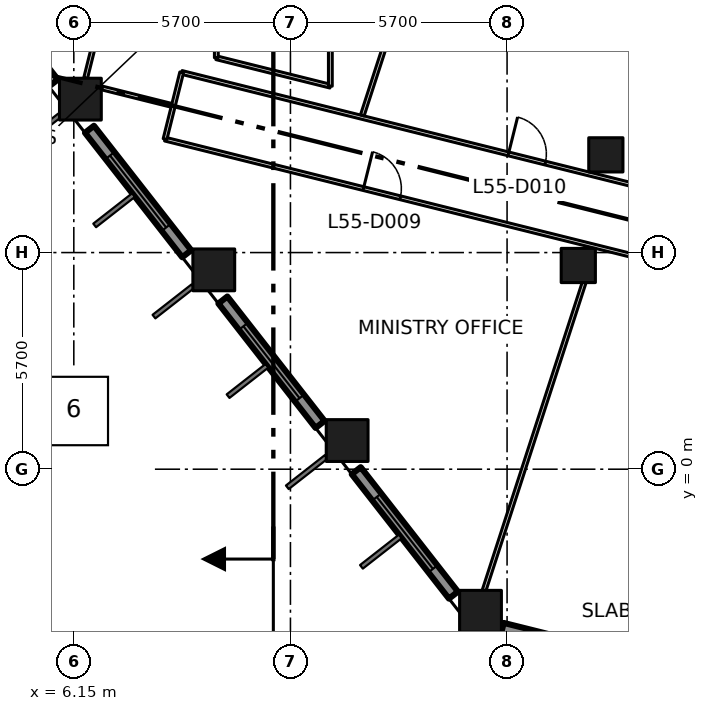
"""IFC4 building model, lengths in metres.
Left out: names, types, materials, properties, quantities, classifications, styles, units other than length and angle.
Written with IfcOpenShell. Run it as: python <this file> out.ifc"""

import sys

from ifc_helpers import new_model, si_unit, direction, frame, frame_2d, origin, origin_2d, place, context, subcontext, project, spatial, rectangle, extrude, element, fill, save


model = new_model("IFC4")
c1 = context("Model", 3, precision=1e-05, world=origin(), true_north=direction((0.0, 1.0)))
c2 = subcontext(c1, "Body", "Model", "MODEL_VIEW")
j1 = project(units=[si_unit("LENGTHUNIT", "METRE"), si_unit("PLANEANGLEUNIT", "RADIAN")], contexts=[c1])
p1 = place(None, origin())
s1 = spatial("IfcSite", under=j1, at=p1, CompositionType="ELEMENT")
p2 = place(p1, origin())
s2 = spatial("IfcBuilding", under=s1, at=p2, CompositionType="ELEMENT")
p3 = place(p2, frame((0.0, 0.0, 242.4)))
s3 = spatial("IfcBuildingStorey", under=s2, at=p3, CompositionType="ELEMENT", Elevation=242.4)
for number, where, z_axis, x_axis in (
    (1, (16.851, -3.738, 0.0), (0.0, 0.0, 1.0), (1.0, 0.0, 0.0)),
    (2, (13.342, 0.754, 0.0), (0.0, 0.0, 1.0), (1.0, 0.0, 0.0)),
    (3, (9.833, 5.245, 0.0), (0.0, 0.0, 1.0), (1.0, 0.0, 0.0)),
    (4, (6.323, 9.737, 0.0), (0.0, 0.0, 1.0), (1.0, 0.0, 0.0)),
):
    element("IfcColumn", number, at=place(p3, frame(where, z_axis=z_axis, x_axis=x_axis)), inside=s3, PredefinedType="COLUMN", context=c2, shape_type="SweptSolid", body=[
        extrude(rectangle(XDim=1.1, YDim=1.1, at=origin_2d()), origin(), (0.0, 0.0, 1.0), 4.2),
    ])
for number, where, z_axis, x_axis in (
    (5, (19.424, 5.36, 0.0), (0.0, 0.0, 1.0), (1.0, 0.0, 0.0)),
    (6, (20.149, 8.271, 0.0), (0.0, 0.0, 1.0), (1.0, 0.0, 0.0)),
):
    element("IfcColumn", number, at=place(p3, frame(where, z_axis=z_axis, x_axis=x_axis)), inside=s3, PredefinedType="COLUMN", context=c2, shape_type="SweptSolid", body=[
        extrude(rectangle(XDim=0.9, YDim=0.9, at=origin_2d()), origin(), (0.0, 0.0, 1.0), 4.2),
    ])
p4 = place(p3, frame((3.053, 13.436, 0.0), z_axis=(0.0, 0.0, 1.0), x_axis=(0.615699893917, -0.787980736205, 0.0)))
e7 = element("IfcWall", 7, at=p4, inside=s3, PredefinedType="SOLIDWALL", context=c2, shape_type="SweptSolid", body=[
    extrude(rectangle(XDim=4.156, YDim=0.3, at=frame_2d((2.078, 0.0))), origin(), (0.0, 0.0, 1.0), 3.15),
])
p5 = place(p4, frame((0.878, 0.0, 0.8)))
e8 = element("IfcOpeningElement", 8, at=p5, cuts=e7, PredefinedType="OPENING", context=c2, shape_type="SweptSolid", body=[
    extrude(rectangle(XDim=2.4, YDim=2.1, at=frame_2d((1.2, 1.05))), frame((0.0, 0.16, 0.0), z_axis=(0.0, -1.0, 0.0), x_axis=(1.0, 0.0, 0.0)), (0.0, 0.0, 1.0), 0.32),
])
p6 = place(p3, frame((6.562, 8.944, 0.0), z_axis=(0.0, 0.0, 1.0), x_axis=(0.615699893917, -0.787980736205, 0.0)))
e9 = element("IfcWall", 9, at=p6, inside=s3, PredefinedType="SOLIDWALL", context=c2, shape_type="SweptSolid", body=[
    extrude(rectangle(XDim=4.156, YDim=0.3, at=frame_2d((2.078, 0.0))), origin(), (0.0, 0.0, 1.0), 3.15),
])
p7 = place(p6, frame((0.878, 0.0, 0.8)))
e10 = element("IfcOpeningElement", 10, at=p7, cuts=e9, PredefinedType="OPENING", context=c2, shape_type="SweptSolid", body=[
    extrude(rectangle(XDim=2.4, YDim=2.1, at=frame_2d((1.2, 1.05))), frame((0.0, 0.16, 0.0), z_axis=(0.0, -1.0, 0.0), x_axis=(1.0, 0.0, 0.0)), (0.0, 0.0, 1.0), 0.32),
])
p8 = place(p3, frame((10.072, 4.452, 0.0), z_axis=(0.0, 0.0, 1.0), x_axis=(0.615660006568, -0.788011901124, 0.0)))
e11 = element("IfcWall", 11, at=p8, inside=s3, PredefinedType="SOLIDWALL", context=c2, shape_type="SweptSolid", body=[
    extrude(rectangle(XDim=4.155, YDim=0.3, at=frame_2d((2.077, 0.0))), origin(), (0.0, 0.0, 1.0), 3.15),
])
p9 = place(p8, frame((0.878, 0.0, 0.8)))
e12 = element("IfcOpeningElement", 12, at=p9, cuts=e11, PredefinedType="OPENING", context=c2, shape_type="SweptSolid", body=[
    extrude(rectangle(XDim=2.4, YDim=2.1, at=frame_2d((1.2, 1.05))), frame((0.0, 0.16, 0.0), z_axis=(0.0, -1.0, 0.0), x_axis=(1.0, 0.0, 0.0)), (0.0, 0.0, 1.0), 0.32),
])
p10 = place(p3, frame((13.581, -0.039, 0.0), z_axis=(0.0, 0.0, 1.0), x_axis=(0.615545986363, -0.788100969846, 0.0)))
e13 = element("IfcWall", 13, at=p10, inside=s3, PredefinedType="SOLIDWALL", context=c2, shape_type="SweptSolid", body=[
    extrude(rectangle(XDim=4.156, YDim=0.3, at=frame_2d((2.078, 0.0))), origin(), (0.0, 0.0, 1.0), 3.15),
])
p11 = place(p10, frame((0.878, 0.0, 0.8)))
e14 = element("IfcOpeningElement", 14, at=p11, cuts=e13, PredefinedType="OPENING", context=c2, shape_type="SweptSolid", body=[
    extrude(rectangle(XDim=2.4, YDim=2.1, at=frame_2d((1.2, 1.05))), frame((0.0, 0.16, 0.0), z_axis=(0.0, -1.0, 0.0), x_axis=(1.0, 0.0, 0.0)), (0.0, 0.0, 1.0), 0.32),
])
p12 = place(p3, frame((17.425, -4.19, 0.0), z_axis=(0.0, 0.0, 1.0), x_axis=(0.970270592847, -0.242022677978, 0.0)))
e15 = element("IfcWall", 15, at=p12, inside=s3, PredefinedType="SOLIDWALL", context=c2, shape_type="SweptSolid", body=[
    extrude(rectangle(XDim=4.368, YDim=0.3, at=frame_2d((2.184, 0.0))), origin(), (0.0, 0.0, 1.0), 3.15),
])
p13 = place(p12, frame((0.983, 0.0, 0.8)))
e16 = element("IfcOpeningElement", 16, at=p13, cuts=e15, PredefinedType="OPENING", context=c2, shape_type="SweptSolid", body=[
    extrude(rectangle(XDim=2.4, YDim=2.1, at=frame_2d((1.2, 1.05))), frame((0.0, 0.16, 0.0), z_axis=(0.0, -1.0, 0.0), x_axis=(1.0, 0.0, 0.0)), (0.0, 0.0, 1.0), 0.32),
])
p14 = place(p3, frame((8.55, 8.685, 0.0), z_axis=(0.0, 0.0, 1.0), x_axis=(0.970297603286, -0.241914367199, 0.0)))
e17 = element("IfcWall", 17, at=p14, inside=s3, PredefinedType="PARTITIONING", context=c2, shape_type="SweptSolid", body=[
    extrude(rectangle(XDim=50.675, YDim=0.1, at=frame_2d((25.337, 0.0))), origin(), (0.0, 0.0, 1.0), 3.9),
])
p15 = place(p14, frame((35.657, 0.0, 0.0)))
e18 = element("IfcOpeningElement", 18, at=p15, cuts=e17, PredefinedType="OPENING", context=c2, shape_type="SweptSolid", body=[
    extrude(rectangle(XDim=1.8, YDim=2.1, at=frame_2d((0.9, 1.05))), frame((0.0, 0.06, 0.0), z_axis=(0.0, -1.0, 0.0), x_axis=(1.0, 0.0, 0.0)), (0.0, 0.0, 1.0), 0.12),
])
p16 = place(p14, frame((14.657, 0.0, 0.0)))
e19 = element("IfcOpeningElement", 19, at=p16, cuts=e17, PredefinedType="OPENING", context=c2, shape_type="SweptSolid", body=[
    extrude(rectangle(XDim=1.0, YDim=2.1, at=frame_2d((0.5, 1.05))), frame((0.0, 0.06, 0.0), z_axis=(0.0, -1.0, 0.0), x_axis=(1.0, 0.0, 0.0)), (0.0, 0.0, 1.0), 0.12),
])
p17 = place(p14, frame((19.357, 0.0, 0.0)))
e20 = element("IfcOpeningElement", 20, at=p17, cuts=e17, PredefinedType="OPENING", context=c2, shape_type="SweptSolid", body=[
    extrude(rectangle(XDim=1.8, YDim=2.1, at=frame_2d((0.9, 1.05))), frame((0.0, 0.06, 0.0), z_axis=(0.0, -1.0, 0.0), x_axis=(1.0, 0.0, 0.0)), (0.0, 0.0, 1.0), 0.12),
])
p18 = place(p14, frame((5.38, 0.0, 0.0)))
e21 = element("IfcOpeningElement", 21, at=p18, cuts=e17, PredefinedType="OPENING", context=c2, shape_type="SweptSolid", body=[
    extrude(rectangle(XDim=1.0, YDim=2.1, at=frame_2d((0.5, 1.05))), frame((0.0, 0.06, 0.0), z_axis=(0.0, -1.0, 0.0), x_axis=(1.0, 0.0, 0.0)), (0.0, 0.0, 1.0), 0.12),
])
p19 = place(p3, frame((8.988, 10.44, 0.0), z_axis=(0.0, 0.0, 1.0), x_axis=(0.970301223092, -0.241899848006, 0.0)))
e22 = element("IfcWall", 22, at=p19, inside=s3, PredefinedType="PARTITIONING", context=c2, shape_type="SweptSolid", body=[
    extrude(rectangle(XDim=19.879, YDim=0.1, at=frame_2d((9.94, 0.0))), origin(), (0.0, 0.0, 1.0), 3.9),
])
p20 = place(p19, frame((8.861, 0.0, 0.0)))
e23 = element("IfcOpeningElement", 23, at=p20, cuts=e22, PredefinedType="OPENING", context=c2, shape_type="SweptSolid", body=[
    extrude(rectangle(XDim=1.0, YDim=2.1, at=frame_2d((0.5, 1.05))), frame((0.0, 0.06, 0.0), z_axis=(0.0, -1.0, 0.0), x_axis=(1.0, 0.0, 0.0)), (0.0, 0.0, 1.0), 0.12),
])
p21 = place(p3, frame((8.988, 10.44, 0.0), z_axis=(0.0, 0.0, 1.0), x_axis=(-0.242154485745, -0.970237705428, 0.0)))
e24 = element("IfcWall", 24, at=p21, inside=s3, PredefinedType="PARTITIONING", context=c2, shape_type="SweptSolid", body=[
    extrude(rectangle(XDim=1.809, YDim=0.1, at=frame_2d((0.904, 0.0))), origin(), (0.0, 0.0, 1.0), 3.9),
])
p22 = place(p3, frame((9.9, 10.826, 0.0), z_axis=(0.0, 0.0, 1.0), x_axis=(0.970290953223, -0.241941038466, 0.0)))
e25 = element("IfcWall", 25, at=p22, inside=s3, PredefinedType="PARTITIONING", context=c2, shape_type="SweptSolid", body=[
    extrude(rectangle(XDim=3.092, YDim=0.1, at=frame_2d((1.546, 0.0))), origin(), (0.0, 0.0, 1.0), 3.9),
])
p23 = place(p3, frame((9.9, 12.2, 0.0), z_axis=(0.0, 0.0, 1.0), x_axis=(0.0, -1.0, 0.0)))
e26 = element("IfcWall", 26, at=p23, inside=s3, PredefinedType="PARTITIONING", context=c2, shape_type="SweptSolid", body=[
    extrude(rectangle(XDim=1.374, YDim=0.1, at=frame_2d((0.687, 0.0))), origin(), (0.0, 0.0, 1.0), 3.9),
])
p24 = place(p3, frame((12.9, 10.078, 0.0), z_axis=(0.0, 0.0, 1.0), x_axis=(0.0, 1.0, 0.0)))
e27 = element("IfcWall", 27, at=p24, inside=s3, PredefinedType="PARTITIONING", context=c2, shape_type="SweptSolid", body=[
    extrude(rectangle(XDim=4.022, YDim=0.1, at=frame_2d((2.011, 0.0))), origin(), (0.0, 0.0, 1.0), 3.9),
])
p25 = place(p3, frame((6.922, 12.138, 0.0), z_axis=(0.0, 0.0, 1.0), x_axis=(-0.242264600824, -0.970210215978, 0.0)))
e28 = element("IfcWall", 28, at=p25, inside=s3, PredefinedType="PARTITIONING", context=c2, shape_type="SweptSolid", body=[
    extrude(rectangle(XDim=1.908, YDim=0.1, at=frame_2d((0.954, 0.0))), origin(), (0.0, 0.0, 1.0), 3.9),
])
p26 = place(p3, frame((8.72, 9.574, 0.0), z_axis=(0.0, 0.0, 1.0), x_axis=(-0.970240497311, 0.242143299263, 0.0)))
e29 = element("IfcWall", 29, at=p26, inside=s3, PredefinedType="PARTITIONING", context=c2, shape_type="SweptSolid", body=[
    extrude(rectangle(XDim=1.904, YDim=0.1, at=frame_2d((0.952, 0.0))), origin(), (0.0, 0.0, 1.0), 3.9),
])
p27 = place(p3, frame((13.741, 9.31, 0.0), z_axis=(0.0, 0.0, 1.0), x_axis=(0.308976461467, 0.95106968528, 0.0)))
e30 = element("IfcWall", 30, at=p27, inside=s3, PredefinedType="PARTITIONING", context=c2, shape_type="SweptSolid", body=[
    extrude(rectangle(XDim=5.036, YDim=0.1, at=frame_2d((2.518, 0.0))), origin(), (0.0, 0.0, 1.0), 3.9),
])
p28 = place(p3, frame((16.946, -3.188, 0.0), z_axis=(0.0, 0.0, 1.0), x_axis=(0.308984279279, 0.951067145452, 0.0)))
e31 = element("IfcWall", 31, at=p28, inside=s3, PredefinedType="PARTITIONING", context=c2, shape_type="SweptSolid", body=[
    extrude(rectangle(XDim=8.515, YDim=0.1, at=frame_2d((4.257, 0.0))), origin(), (0.0, 0.0, 1.0), 3.9),
])
p29 = place(p7, origin())
e32 = element("IfcWindow", 32, at=p29, inside=s3, PartitioningType="DOUBLE_PANEL_VERTICAL", PredefinedType="WINDOW", context=c2, shape_type="SweptSolid", body=[
    extrude(rectangle(XDim=2.4, YDim=2.1, at=frame_2d((1.2, 1.05))), frame((0.0, 0.03, 0.0), z_axis=(0.0, -1.0, 0.0), x_axis=(1.0, 0.0, 0.0)), (0.0, 0.0, 1.0), 0.06),
])
fill(e10, e32)
p30 = place(p9, origin())
e33 = element("IfcWindow", 33, at=p30, inside=s3, PartitioningType="DOUBLE_PANEL_VERTICAL", PredefinedType="WINDOW", context=c2, shape_type="SweptSolid", body=[
    extrude(rectangle(XDim=2.4, YDim=2.1, at=frame_2d((1.2, 1.05))), frame((0.0, 0.03, 0.0), z_axis=(0.0, -1.0, 0.0), x_axis=(1.0, 0.0, 0.0)), (0.0, 0.0, 1.0), 0.06),
])
fill(e12, e33)
p31 = place(p11, origin())
e34 = element("IfcWindow", 34, at=p31, inside=s3, PartitioningType="DOUBLE_PANEL_VERTICAL", PredefinedType="WINDOW", context=c2, shape_type="SweptSolid", body=[
    extrude(rectangle(XDim=2.4, YDim=2.1, at=frame_2d((1.2, 1.05))), frame((0.0, 0.03, 0.0), z_axis=(0.0, -1.0, 0.0), x_axis=(1.0, 0.0, 0.0)), (0.0, 0.0, 1.0), 0.06),
])
fill(e14, e34)
p32 = place(p18, origin())
e35 = element("IfcDoor", 35, at=p32, inside=s3, OperationType="SINGLE_SWING_LEFT", PredefinedType="DOOR", context=c2, shape_type="SweptSolid", body=[
    extrude(rectangle(XDim=1.0, YDim=2.1, at=frame_2d((0.5, 1.05))), frame((0.0, 0.025, 0.0), z_axis=(0.0, -1.0, 0.0), x_axis=(1.0, 0.0, 0.0)), (0.0, 0.0, 1.0), 0.05),
])
fill(e21, e35)
p33 = place(p20, origin())
e36 = element("IfcDoor", 36, at=p33, inside=s3, OperationType="SINGLE_SWING_LEFT", PredefinedType="DOOR", context=c2, shape_type="SweptSolid", body=[
    extrude(rectangle(XDim=1.0, YDim=2.1, at=frame_2d((0.5, 1.05))), frame((0.0, 0.025, 0.0), z_axis=(0.0, -1.0, 0.0), x_axis=(1.0, 0.0, 0.0)), (0.0, 0.0, 1.0), 0.05),
])
fill(e23, e36)
save(model, sys.argv[1])
